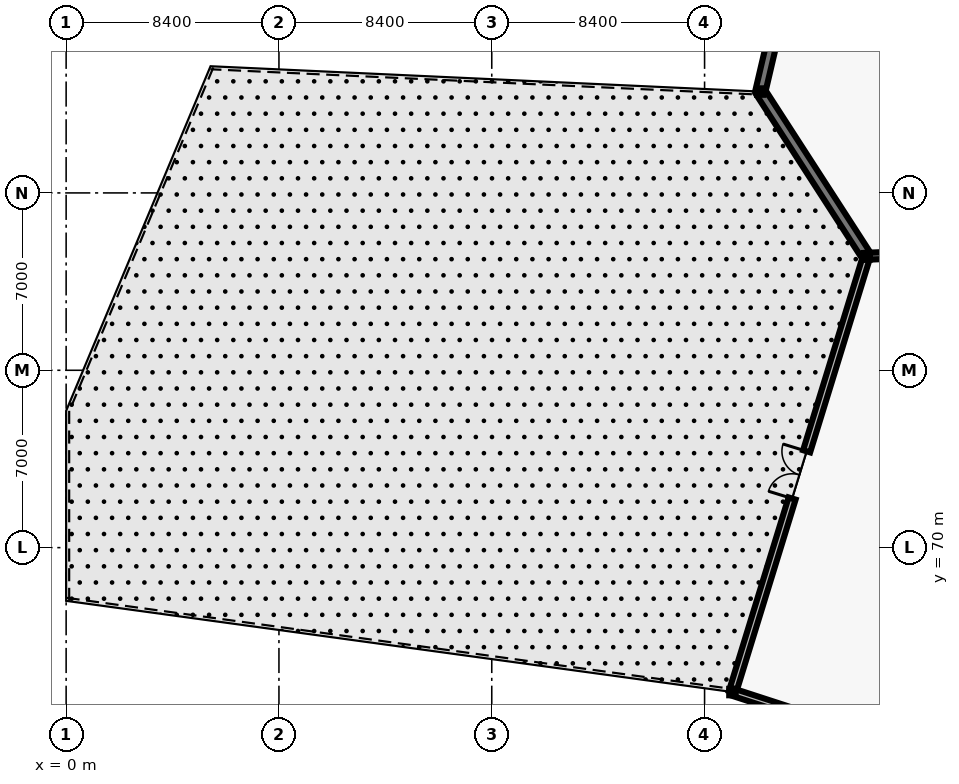
"""IFC4 building model, lengths in metres.
Left out: names, types, materials, properties, quantities, classifications, styles, units other than length and angle.
Written with IfcOpenShell. Run it as: python <this file> out.ifc"""

import sys

from ifc_helpers import new_model, si_unit, direction, frame, frame_2d, origin, origin_2d, place, context, subcontext, project, spatial, rectangle, i_section, extrude, element, fill, save


model = new_model("IFC4")
c1 = context("Model", 3, precision=1e-05, world=origin(), true_north=direction((0.0, 1.0)))
c2 = subcontext(c1, "Body", "Model", "MODEL_VIEW")
j1 = project(units=[si_unit("LENGTHUNIT", "METRE"), si_unit("PLANEANGLEUNIT", "RADIAN")], contexts=[c1])
p1 = place(None, origin())
s1 = spatial("IfcSite", under=j1, at=p1, CompositionType="ELEMENT")
p2 = place(p1, origin())
s2 = spatial("IfcBuilding", under=s1, at=p2, CompositionType="ELEMENT")
p3 = place(p2, frame((0.0, 0.0, 15.0)))
s3 = spatial("IfcBuildingStorey", under=s2, at=p3, CompositionType="ELEMENT", Elevation=15.0)
for number, where, z_axis, x_axis in (
    (1, (26.3, 64.3, 0.0), (0.0, 0.0, 1.0), (1.0, 0.0, 0.0)),
    (2, (27.4, 88.0, 0.0), (0.0, 0.0, 1.0), (1.0, 0.0, 0.0)),
    (3, (31.6, 81.5, 0.0), (0.0, 0.0, 1.0), (1.0, 0.0, 0.0)),
):
    element("IfcColumn", number, at=place(p3, frame(where, z_axis=z_axis, x_axis=x_axis)), inside=s3, PredefinedType="COLUMN", context=c2, shape_type="SweptSolid", body=[
        extrude(i_section(OverallWidth=0.254, OverallDepth=0.254, WebThickness=0.009, FlangeThickness=0.014, FilletRadius=0.013, at=origin_2d()), origin(), (0.0, 0.0, 1.0), 4.8),
    ])
p4 = place(p3, frame((26.3, 64.3, 0.0), z_axis=(0.0, 0.0, 1.0), x_axis=(0.294452119874, 0.955666233108, 0.0)))
e4 = element("IfcWall", 4, at=p4, inside=s3, PredefinedType="SOLIDWALL", context=c2, shape_type="SweptSolid", body=[
    extrude(rectangle(XDim=17.938, YDim=0.29, at=frame_2d((8.969, 0.0))), origin(), (0.0, 0.0, 1.0), 3.62),
])
p5 = place(p4, frame((7.994, 0.0, 0.0)))
e5 = element("IfcOpeningElement", 5, at=p5, cuts=e4, PredefinedType="OPENING", context=c2, shape_type="SweptSolid", body=[
    extrude(rectangle(XDim=1.95, YDim=2.3, at=frame_2d((0.975, 1.15))), frame((0.0, 0.155, 0.0), z_axis=(0.0, -1.0, 0.0), x_axis=(1.0, 0.0, 0.0)), (0.0, 0.0, 1.0), 0.31),
])
p6 = place(p3, frame((49.943, 56.619, 0.0), z_axis=(0.0, 0.0, 1.0), x_axis=(-0.951067694824, 0.308982588283, 0.0)))
e6 = element("IfcWall", 6, at=p6, inside=s3, PredefinedType="SOLIDWALL", context=c2, shape_type="SweptSolid", body=[
    extrude(rectangle(XDim=24.86, YDim=0.29, at=frame_2d((12.43, 0.0))), origin(), (0.0, 0.0, 1.0), 3.62),
])
p7 = place(p3, frame((27.4, 88.0, 0.0), z_axis=(0.0, 0.0, 1.0), x_axis=(0.228114067381, 0.973634414071, 0.0)))
e7 = element("IfcWall", 7, at=p7, inside=s3, PredefinedType="SOLIDWALL", context=c2, shape_type="SweptSolid", body=[
    extrude(rectangle(XDim=17.974, YDim=0.4, at=frame_2d((8.987, 0.0))), origin(), (0.0, 0.0, 1.0), 3.62),
])
p8 = place(p3, frame((31.567, 81.55, 0.0), z_axis=(0.0, 0.0, 1.0), x_axis=(-0.542653962992, 0.839956353895, 0.0)))
e8 = element("IfcWall", 8, at=p8, inside=s3, PredefinedType="SOLIDWALL", context=c2, shape_type="SweptSolid", body=[
    extrude(rectangle(XDim=7.679, YDim=0.4, at=frame_2d((3.839, 0.0))), origin(), (0.0, 0.0, 1.0), 3.62),
])
p9 = place(p3, frame((57.8, 82.6, 0.0), z_axis=(0.0, 0.0, 1.0), x_axis=(-0.999119645224, -0.041951573605, 0.0)))
e9 = element("IfcWall", 9, at=p9, inside=s3, PredefinedType="SOLIDWALL", context=c2, shape_type="SweptSolid", body=[
    extrude(rectangle(XDim=26.223, YDim=0.275, at=frame_2d((13.112, 0.0))), origin(), (0.0, 0.0, 1.0), 4.02),
])
p10 = place(p9, frame((12.312, 0.0, 0.0)))
e10 = element("IfcOpeningElement", 10, at=p10, cuts=e9, PredefinedType="OPENING", context=c2, shape_type="SweptSolid", body=[
    extrude(rectangle(XDim=1.6, YDim=2.45, at=frame_2d((0.8, 1.225))), frame((0.0, 0.147, 0.0), z_axis=(0.0, -1.0, 0.0), x_axis=(1.0, 0.0, 0.0)), (0.0, 0.0, 1.0), 0.295),
])
p11 = place(p5, origin())
e11 = element("IfcDoor", 11, at=p11, inside=s3, OperationType="DOUBLE_DOOR_SINGLE_SWING", PredefinedType="DOOR", context=c2, shape_type="SweptSolid", body=[
    extrude(rectangle(XDim=1.95, YDim=2.3, at=frame_2d((0.975, 1.15))), frame((0.0, 0.025, 0.0), z_axis=(0.0, -1.0, 0.0), x_axis=(1.0, 0.0, 0.0)), (0.0, 0.0, 1.0), 0.05),
])
fill(e5, e11)
save(model, sys.argv[1])
